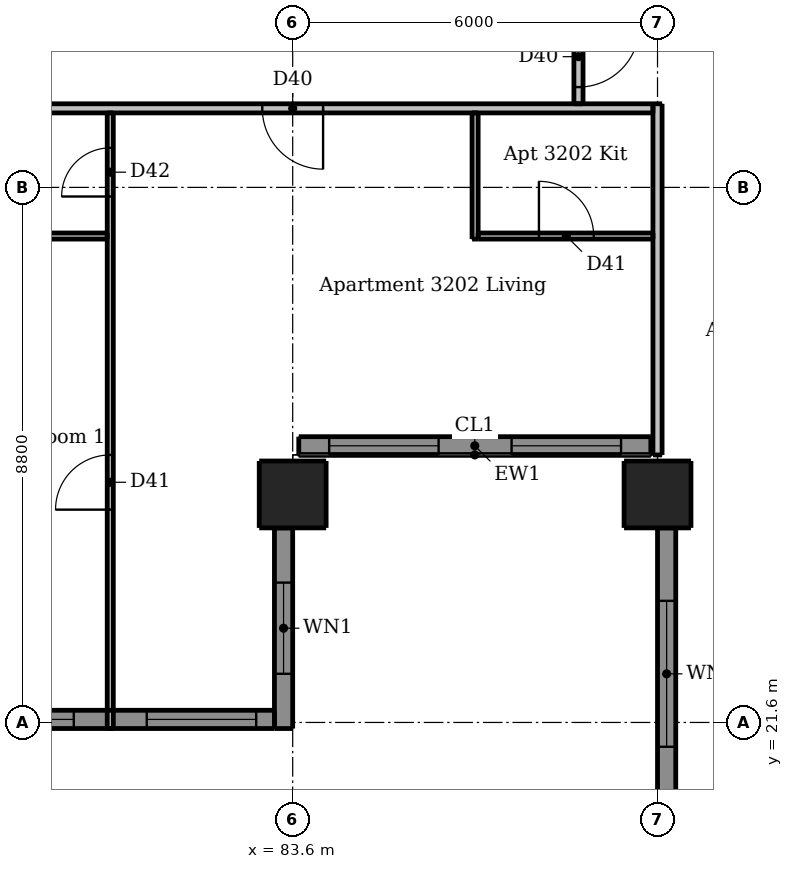
"""IFC4 building model, lengths in metres.
Left out: names, types, materials, properties, quantities, classifications, styles, units other than length and angle.
Written with IfcOpenShell. Run it as: python <this file> out.ifc"""

import sys

from ifc_helpers import new_model, si_unit, direction, frame, frame_2d, origin, origin_2d, place, context, subcontext, project, spatial, rectangle, extrude, element, fill, save


model = new_model("IFC4")
c1 = context("Model", 3, precision=1e-05, world=origin(), true_north=direction((0.0, 1.0)))
c2 = subcontext(c1, "Body", "Model", "MODEL_VIEW")
j1 = project(units=[si_unit("LENGTHUNIT", "METRE"), si_unit("PLANEANGLEUNIT", "RADIAN")], contexts=[c1])
p1 = place(None, origin())
s1 = spatial("IfcSite", under=j1, at=p1, CompositionType="ELEMENT")
p2 = place(p1, origin())
s2 = spatial("IfcBuilding", under=s1, at=p2, CompositionType="ELEMENT")
p3 = place(p2, frame((0.0, 0.0, 118.3)))
s3 = spatial("IfcBuildingStorey", under=s2, at=p3, CompositionType="ELEMENT", Elevation=118.3)
for number, where, z_axis, x_axis in (
    (1, (83.6, 25.35, 0.0), (0.0, 0.0, 1.0), (1.0, 0.0, 0.0)),
    (2, (89.6, 25.35, 0.0), (0.0, 0.0, 1.0), (1.0, 0.0, 0.0)),
):
    element("IfcColumn", number, at=place(p3, frame(where, z_axis=z_axis, x_axis=x_axis)), inside=s3, PredefinedType="COLUMN", context=c2, shape_type="SweptSolid", body=[
        extrude(rectangle(XDim=1.1, YDim=1.1, at=origin_2d()), origin(), (0.0, 0.0, 1.0), 3.05),
    ])
p4 = place(p3, frame((83.45, 21.5, 0.0), z_axis=(0.0, 0.0, 1.0), x_axis=(0.0, 1.0, 0.0)))
e3 = element("IfcWall", 3, at=p4, inside=s3, PredefinedType="SOLIDWALL", context=c2, shape_type="SweptSolid", body=[
    extrude(rectangle(XDim=3.3, YDim=0.3, at=frame_2d((1.65, 0.0))), origin(), (0.0, 0.0, 1.0), 3.05),
])
p5 = place(p4, frame((0.9, 0.0, 0.9)))
e4 = element("IfcOpeningElement", 4, at=p5, cuts=e3, PredefinedType="OPENING", context=c2, shape_type="SweptSolid", body=[
    extrude(rectangle(XDim=1.5, YDim=1.5, at=frame_2d((0.75, 0.75))), frame((0.0, 0.16, 0.0), z_axis=(0.0, -1.0, 0.0), x_axis=(1.0, 0.0, 0.0)), (0.0, 0.0, 1.0), 0.32),
])
p6 = place(p3, frame((89.75, 24.8, 0.0), z_axis=(0.0, 0.0, 1.0), x_axis=(0.0, -1.0, 0.0)))
e5 = element("IfcWall", 5, at=p6, inside=s3, PredefinedType="SOLIDWALL", context=c2, shape_type="SweptSolid", body=[
    extrude(rectangle(XDim=4.8, YDim=0.3, at=frame_2d((2.4, 0.0))), origin(), (0.0, 0.0, 1.0), 3.05),
])
p7 = place(p6, frame((1.2, 0.0, 0.15)))
e6 = element("IfcOpeningElement", 6, at=p7, cuts=e5, PredefinedType="OPENING", context=c2, shape_type="SweptSolid", body=[
    extrude(rectangle(XDim=2.4, YDim=2.1, at=frame_2d((1.2, 1.05))), frame((0.0, 0.16, 0.0), z_axis=(0.0, -1.0, 0.0), x_axis=(1.0, 0.0, 0.0)), (0.0, 0.0, 1.0), 0.32),
])
p8 = place(p3, frame((77.9, 21.65, 0.0), z_axis=(0.0, 0.0, 1.0), x_axis=(1.0, 0.0, 0.0)))
e7 = element("IfcWall", 7, at=p8, inside=s3, PredefinedType="SOLIDWALL", context=c2, shape_type="SweptSolid", body=[
    extrude(rectangle(XDim=5.4, YDim=0.3, at=frame_2d((2.7, 0.0))), origin(), (0.0, 0.0, 1.0), 3.05),
])
p9 = place(p8, frame((0.3, 0.0, 0.15)))
e8 = element("IfcOpeningElement", 8, at=p9, cuts=e7, PredefinedType="OPENING", context=c2, shape_type="SweptSolid", body=[
    extrude(rectangle(XDim=1.8, YDim=2.1, at=frame_2d((0.9, 1.05))), frame((0.0, 0.16, 0.0), z_axis=(0.0, -1.0, 0.0), x_axis=(1.0, 0.0, 0.0)), (0.0, 0.0, 1.0), 0.32),
])
p10 = place(p8, frame((3.3, 0.0, 0.15)))
e9 = element("IfcOpeningElement", 9, at=p10, cuts=e7, PredefinedType="OPENING", context=c2, shape_type="SweptSolid", body=[
    extrude(rectangle(XDim=1.8, YDim=2.1, at=frame_2d((0.9, 1.05))), frame((0.0, 0.16, 0.0), z_axis=(0.0, -1.0, 0.0), x_axis=(1.0, 0.0, 0.0)), (0.0, 0.0, 1.0), 0.32),
])
p11 = place(p3, frame((83.7, 26.15, 0.0), z_axis=(0.0, 0.0, 1.0), x_axis=(1.0, 0.0, 0.0)))
e10 = element("IfcWall", 10, at=p11, inside=s3, PredefinedType="SOLIDWALL", context=c2, shape_type="SweptSolid", body=[
    extrude(rectangle(XDim=5.79, YDim=0.3, at=frame_2d((2.895, 0.0))), origin(), (0.0, 0.0, 1.0), 3.05),
])
p12 = place(p11, frame((0.5, 0.0, 0.15)))
e11 = element("IfcOpeningElement", 11, at=p12, cuts=e10, PredefinedType="OPENING", context=c2, shape_type="SweptSolid", body=[
    extrude(rectangle(XDim=1.8, YDim=2.1, at=frame_2d((0.9, 1.05))), frame((0.0, 0.16, 0.0), z_axis=(0.0, -1.0, 0.0), x_axis=(1.0, 0.0, 0.0)), (0.0, 0.0, 1.0), 0.32),
])
p13 = place(p11, frame((3.5, 0.0, 0.15)))
e12 = element("IfcOpeningElement", 12, at=p13, cuts=e10, PredefinedType="OPENING", context=c2, shape_type="SweptSolid", body=[
    extrude(rectangle(XDim=1.8, YDim=2.1, at=frame_2d((0.9, 1.05))), frame((0.0, 0.16, 0.0), z_axis=(0.0, -1.0, 0.0), x_axis=(1.0, 0.0, 0.0)), (0.0, 0.0, 1.0), 0.32),
])
p14 = place(p3, frame((80.6, 21.5, 0.0), z_axis=(0.0, 0.0, 1.0), x_axis=(0.0, 1.0, 0.0)))
e13 = element("IfcWall", 13, at=p14, inside=s3, PredefinedType="PARTITIONING", context=c2, shape_type="SweptSolid", body=[
    extrude(rectangle(XDim=10.125, YDim=0.1, at=frame_2d((5.062, 0.0))), origin(), (0.0, 0.0, 1.0), 3.05),
])
p15 = place(p14, frame((3.6, 0.0, 0.0)))
e14 = element("IfcOpeningElement", 14, at=p15, cuts=e13, PredefinedType="OPENING", context=c2, shape_type="SweptSolid", body=[
    extrude(rectangle(XDim=0.9, YDim=2.1, at=frame_2d((0.45, 1.05))), frame((0.0, 0.06, 0.0), z_axis=(0.0, -1.0, 0.0), x_axis=(1.0, 0.0, 0.0)), (0.0, 0.0, 1.0), 0.12),
])
p16 = place(p14, frame((8.75, 0.0, 0.0)))
e15 = element("IfcOpeningElement", 15, at=p16, cuts=e13, PredefinedType="OPENING", context=c2, shape_type="SweptSolid", body=[
    extrude(rectangle(XDim=0.8, YDim=2.1, at=frame_2d((0.4, 1.05))), frame((0.0, 0.06, 0.0), z_axis=(0.0, -1.0, 0.0), x_axis=(1.0, 0.0, 0.0)), (0.0, 0.0, 1.0), 0.12),
])
p17 = place(p3, frame((86.6, 29.55, 0.0), z_axis=(0.0, 0.0, 1.0), x_axis=(0.0, 1.0, 0.0)))
e16 = element("IfcWall", 16, at=p17, inside=s3, PredefinedType="PARTITIONING", context=c2, shape_type="SweptSolid", body=[
    extrude(rectangle(XDim=2.075, YDim=0.1, at=frame_2d((1.038, 0.0))), origin(), (0.0, 0.0, 1.0), 3.05),
])
p18 = place(p3, frame((77.05, 29.6, 0.0), z_axis=(0.0, 0.0, 1.0), x_axis=(1.0, 0.0, 0.0)))
e17 = element("IfcWall", 17, at=p18, inside=s3, PredefinedType="PARTITIONING", context=c2, shape_type="SweptSolid", body=[
    extrude(rectangle(XDim=3.5, YDim=0.1, at=frame_2d((1.75, 0.0))), origin(), (0.0, 0.0, 1.0), 3.05),
])
p19 = place(p3, frame((86.65, 29.6, 0.0), z_axis=(0.0, 0.0, 1.0), x_axis=(1.0, 0.0, 0.0)))
e18 = element("IfcWall", 18, at=p19, inside=s3, PredefinedType="PARTITIONING", context=c2, shape_type="SweptSolid", body=[
    extrude(rectangle(XDim=2.875, YDim=0.1, at=frame_2d((1.438, 0.0))), origin(), (0.0, 0.0, 1.0), 3.05),
])
p20 = place(p19, frame((1.0, 0.0, 0.0)))
e19 = element("IfcOpeningElement", 19, at=p20, cuts=e18, PredefinedType="OPENING", context=c2, shape_type="SweptSolid", body=[
    extrude(rectangle(XDim=0.9, YDim=2.1, at=frame_2d((0.45, 1.05))), frame((0.0, 0.06, 0.0), z_axis=(0.0, -1.0, 0.0), x_axis=(1.0, 0.0, 0.0)), (0.0, 0.0, 1.0), 0.12),
])
p21 = place(p3, frame((88.3, 60.475, 0.0), z_axis=(0.0, 0.0, 1.0), x_axis=(0.0, -1.0, 0.0)))
e20 = element("IfcWall", 20, at=p21, inside=s3, PredefinedType="PARTITIONING", context=c2, shape_type="SweptSolid", body=[
    extrude(rectangle(XDim=28.7, YDim=0.15, at=frame_2d((14.35, 0.0))), origin(), (0.0, 0.0, 1.0), 3.05),
])
p22 = place(p21, frame((27.425, 0.0, 0.0)))
e21 = element("IfcOpeningElement", 21, at=p22, cuts=e20, PredefinedType="OPENING", context=c2, shape_type="SweptSolid", body=[
    extrude(rectangle(XDim=1.0, YDim=2.1, at=frame_2d((0.5, 1.05))), frame((0.0, 0.085, 0.0), z_axis=(0.0, -1.0, 0.0), x_axis=(1.0, 0.0, 0.0)), (0.0, 0.0, 1.0), 0.17),
])
p23 = place(p21, frame((13.075, 0.0, 0.0)))
e22 = element("IfcOpeningElement", 22, at=p23, cuts=e20, PredefinedType="OPENING", context=c2, shape_type="SweptSolid", body=[
    extrude(rectangle(XDim=1.0, YDim=2.1, at=frame_2d((0.5, 1.05))), frame((0.0, 0.085, 0.0), z_axis=(0.0, -1.0, 0.0), x_axis=(1.0, 0.0, 0.0)), (0.0, 0.0, 1.0), 0.17),
])
p24 = place(p21, frame((2.575, 0.0, 0.0)))
e23 = element("IfcOpeningElement", 23, at=p24, cuts=e20, PredefinedType="OPENING", context=c2, shape_type="SweptSolid", body=[
    extrude(rectangle(XDim=1.0, YDim=2.1, at=frame_2d((0.5, 1.05))), frame((0.0, 0.085, 0.0), z_axis=(0.0, -1.0, 0.0), x_axis=(1.0, 0.0, 0.0)), (0.0, 0.0, 1.0), 0.17),
])
p25 = place(p3, frame((89.6, 26.0, 0.0), z_axis=(0.0, 0.0, 1.0), x_axis=(0.0, 1.0, 0.0)))
e24 = element("IfcWall", 24, at=p25, inside=s3, PredefinedType="PARTITIONING", context=c2, shape_type="SweptSolid", body=[
    extrude(rectangle(XDim=5.775, YDim=0.15, at=frame_2d((2.887, 0.0))), origin(), (0.0, 0.0, 1.0), 2.516),
])
p26 = place(p3, frame((89.525, 31.7, 0.0), z_axis=(0.0, 0.0, 1.0), x_axis=(-1.0, 0.0, 0.0)))
e25 = element("IfcWall", 25, at=p26, inside=s3, PredefinedType="PARTITIONING", context=c2, shape_type="SweptSolid", body=[
    extrude(rectangle(XDim=28.75, YDim=0.15, at=frame_2d((14.375, 0.0))), origin(), (0.0, 0.0, 1.0), 3.05),
])
p27 = place(p26, frame((24.625, 0.0, 0.0)))
e26 = element("IfcOpeningElement", 26, at=p27, cuts=e25, PredefinedType="OPENING", context=c2, shape_type="SweptSolid", body=[
    extrude(rectangle(XDim=1.0, YDim=2.1, at=frame_2d((0.5, 1.05))), frame((0.0, 0.085, 0.0), z_axis=(0.0, -1.0, 0.0), x_axis=(1.0, 0.0, 0.0)), (0.0, 0.0, 1.0), 0.17),
])
p28 = place(p26, frame((5.425, 0.0, 0.0)))
e27 = element("IfcOpeningElement", 27, at=p28, cuts=e25, PredefinedType="OPENING", context=c2, shape_type="SweptSolid", body=[
    extrude(rectangle(XDim=1.0, YDim=2.1, at=frame_2d((0.5, 1.05))), frame((0.0, 0.085, 0.0), z_axis=(0.0, -1.0, 0.0), x_axis=(1.0, 0.0, 0.0)), (0.0, 0.0, 1.0), 0.17),
])
p29 = place(p5, origin())
e28 = element("IfcWindow", 28, at=p29, inside=s3, PartitioningType="DOUBLE_PANEL_VERTICAL", PredefinedType="WINDOW", context=c2, shape_type="SweptSolid", body=[
    extrude(rectangle(XDim=1.5, YDim=1.5, at=frame_2d((0.75, 0.75))), frame((0.0, 0.03, 0.0), z_axis=(0.0, -1.0, 0.0), x_axis=(1.0, 0.0, 0.0)), (0.0, 0.0, 1.0), 0.06),
])
fill(e4, e28)
p30 = place(p7, origin())
e29 = element("IfcWindow", 29, at=p30, inside=s3, PartitioningType="DOUBLE_PANEL_VERTICAL", PredefinedType="WINDOW", context=c2, shape_type="SweptSolid", body=[
    extrude(rectangle(XDim=2.4, YDim=2.1, at=frame_2d((1.2, 1.05))), frame((0.0, 0.03, 0.0), z_axis=(0.0, -1.0, 0.0), x_axis=(1.0, 0.0, 0.0)), (0.0, 0.0, 1.0), 0.06),
])
fill(e6, e29)
p31 = place(p9, origin())
e30 = element("IfcWindow", 30, at=p31, inside=s3, PartitioningType="DOUBLE_PANEL_VERTICAL", PredefinedType="WINDOW", context=c2, shape_type="SweptSolid", body=[
    extrude(rectangle(XDim=1.8, YDim=2.1, at=frame_2d((0.9, 1.05))), frame((0.0, 0.03, 0.0), z_axis=(0.0, -1.0, 0.0), x_axis=(1.0, 0.0, 0.0)), (0.0, 0.0, 1.0), 0.06),
])
fill(e8, e30)
p32 = place(p10, origin())
e31 = element("IfcWindow", 31, at=p32, inside=s3, PartitioningType="DOUBLE_PANEL_VERTICAL", PredefinedType="WINDOW", context=c2, shape_type="SweptSolid", body=[
    extrude(rectangle(XDim=1.8, YDim=2.1, at=frame_2d((0.9, 1.05))), frame((0.0, 0.03, 0.0), z_axis=(0.0, -1.0, 0.0), x_axis=(1.0, 0.0, 0.0)), (0.0, 0.0, 1.0), 0.06),
])
fill(e9, e31)
p33 = place(p12, origin())
e32 = element("IfcWindow", 32, at=p33, inside=s3, PartitioningType="DOUBLE_PANEL_VERTICAL", PredefinedType="WINDOW", context=c2, shape_type="SweptSolid", body=[
    extrude(rectangle(XDim=1.8, YDim=2.1, at=frame_2d((0.9, 1.05))), frame((0.0, 0.03, 0.0), z_axis=(0.0, -1.0, 0.0), x_axis=(1.0, 0.0, 0.0)), (0.0, 0.0, 1.0), 0.06),
])
fill(e11, e32)
p34 = place(p13, origin())
e33 = element("IfcWindow", 33, at=p34, inside=s3, PartitioningType="DOUBLE_PANEL_VERTICAL", PredefinedType="WINDOW", context=c2, shape_type="SweptSolid", body=[
    extrude(rectangle(XDim=1.8, YDim=2.1, at=frame_2d((0.9, 1.05))), frame((0.0, 0.03, 0.0), z_axis=(0.0, -1.0, 0.0), x_axis=(1.0, 0.0, 0.0)), (0.0, 0.0, 1.0), 0.06),
])
fill(e12, e33)
p35 = place(p28, origin())
e34 = element("IfcDoor", 34, at=p35, inside=s3, OperationType="SINGLE_SWING_LEFT", PredefinedType="DOOR", context=c2, shape_type="SweptSolid", body=[
    extrude(rectangle(XDim=1.0, YDim=2.1, at=frame_2d((0.5, 1.05))), frame((0.0, 0.025, 0.0), z_axis=(0.0, -1.0, 0.0), x_axis=(1.0, 0.0, 0.0)), (0.0, 0.0, 1.0), 0.05),
])
fill(e27, e34)
p36 = place(p20, origin())
e35 = element("IfcDoor", 35, at=p36, inside=s3, OperationType="SINGLE_SWING_LEFT", PredefinedType="DOOR", context=c2, shape_type="SweptSolid", body=[
    extrude(rectangle(XDim=0.9, YDim=2.1, at=frame_2d((0.45, 1.05))), frame((0.0, 0.025, 0.0), z_axis=(0.0, -1.0, 0.0), x_axis=(1.0, 0.0, 0.0)), (0.0, 0.0, 1.0), 0.05),
])
fill(e19, e35)
p37 = place(p15, origin())
e36 = element("IfcDoor", 36, at=p37, inside=s3, OperationType="SINGLE_SWING_LEFT", PredefinedType="DOOR", context=c2, shape_type="SweptSolid", body=[
    extrude(rectangle(XDim=0.9, YDim=2.1, at=frame_2d((0.45, 1.05))), frame((0.0, 0.025, 0.0), z_axis=(0.0, -1.0, 0.0), x_axis=(1.0, 0.0, 0.0)), (0.0, 0.0, 1.0), 0.05),
])
fill(e14, e36)
p38 = place(p16, origin())
e37 = element("IfcDoor", 37, at=p38, inside=s3, OperationType="SINGLE_SWING_LEFT", PredefinedType="DOOR", context=c2, shape_type="SweptSolid", body=[
    extrude(rectangle(XDim=0.8, YDim=2.1, at=frame_2d((0.4, 1.05))), frame((0.0, 0.025, 0.0), z_axis=(0.0, -1.0, 0.0), x_axis=(1.0, 0.0, 0.0)), (0.0, 0.0, 1.0), 0.05),
])
fill(e15, e37)
p39 = place(p22, origin())
e38 = element("IfcDoor", 38, at=p39, inside=s3, OperationType="SINGLE_SWING_LEFT", PredefinedType="DOOR", context=c2, shape_type="SweptSolid", body=[
    extrude(rectangle(XDim=1.0, YDim=2.1, at=frame_2d((0.5, 1.05))), frame((0.0, 0.025, 0.0), z_axis=(0.0, -1.0, 0.0), x_axis=(1.0, 0.0, 0.0)), (0.0, 0.0, 1.0), 0.05),
])
fill(e21, e38)
save(model, sys.argv[1])
